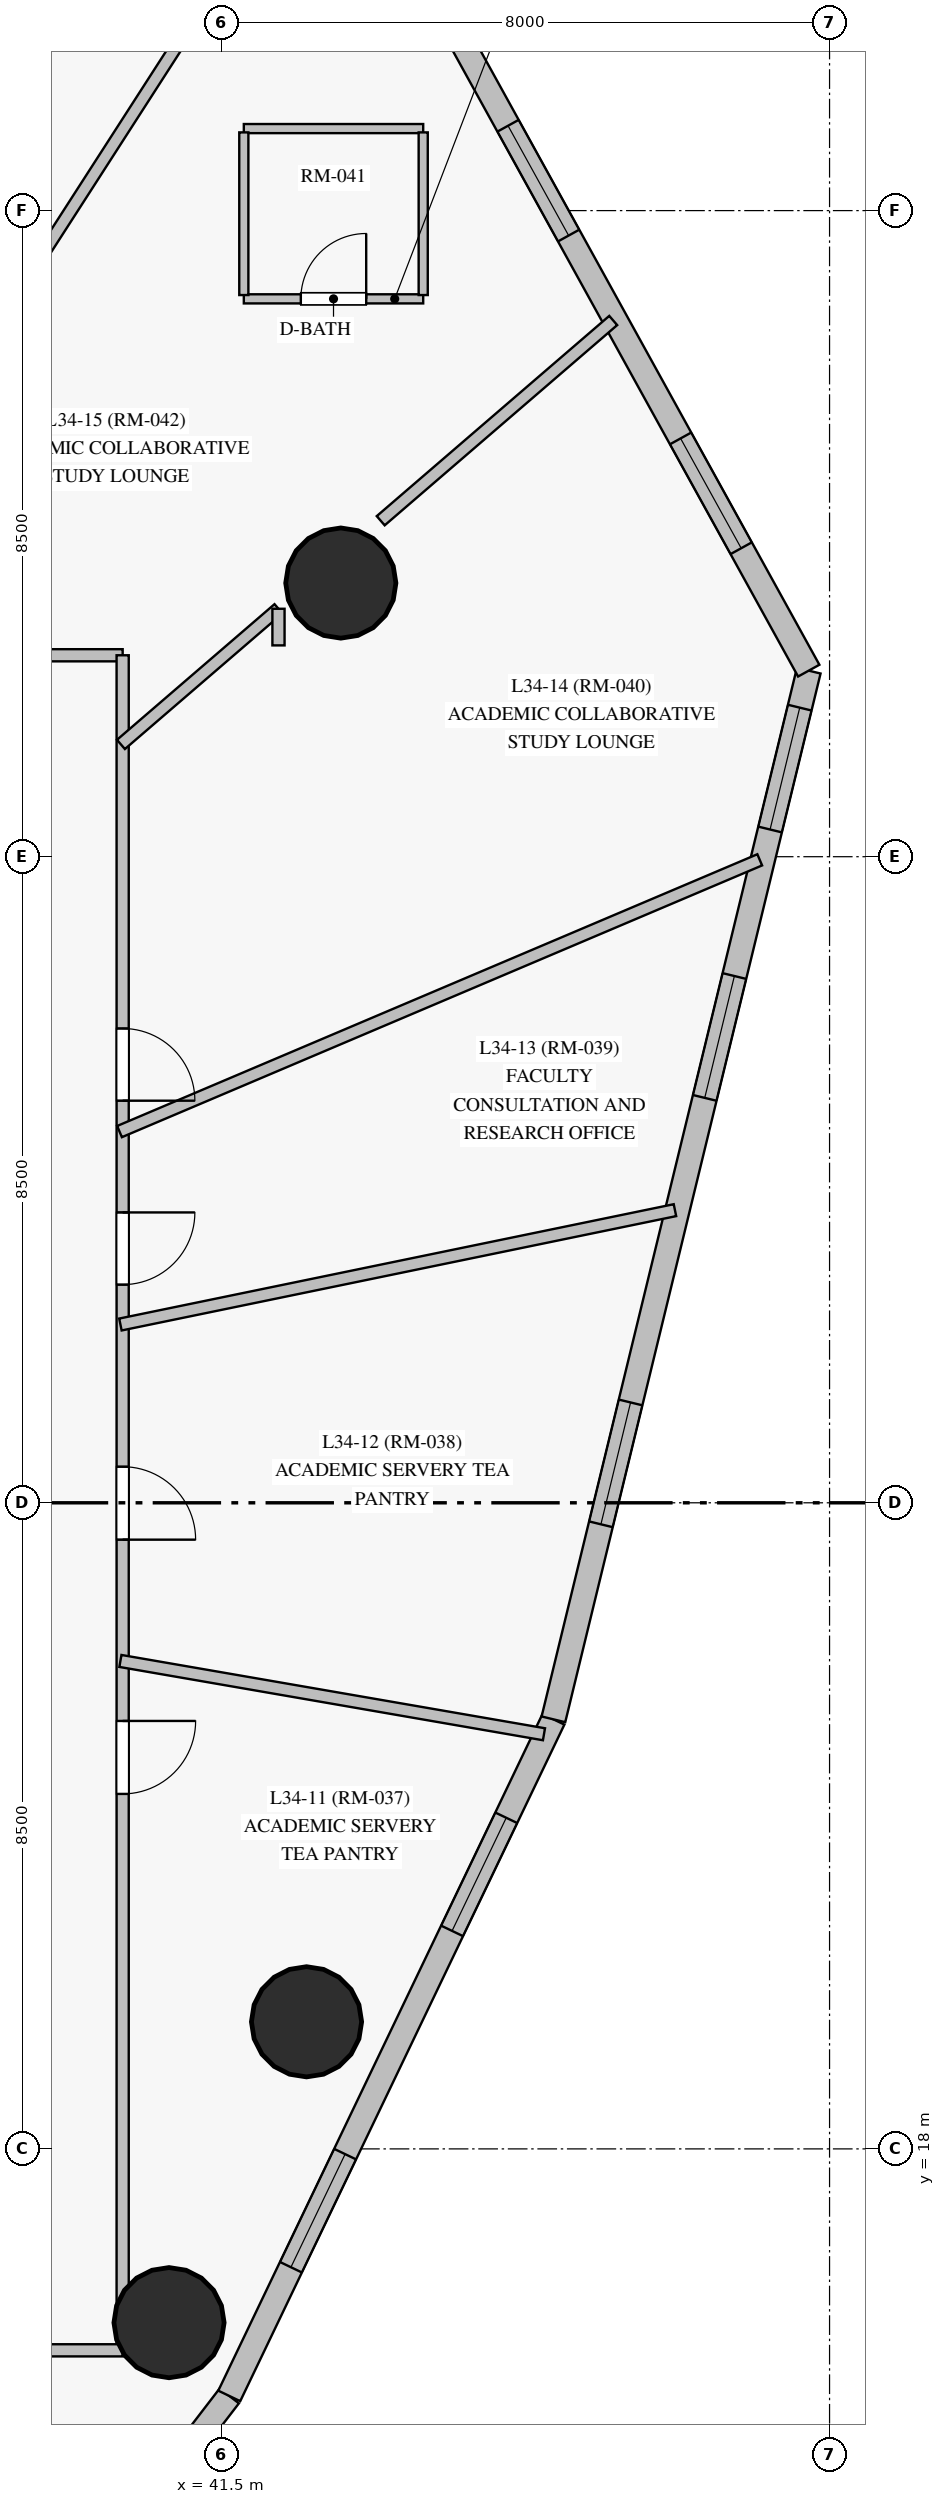
"""IFC4 building model, lengths in metres.
Left out: names, types, materials, properties, quantities, classifications, styles, units other than length and angle.
Written with IfcOpenShell. Run it as: python <this file> out.ifc"""

import sys

from ifc_helpers import new_model, si_unit, direction, frame, frame_2d, origin, origin_with_axes, origin_2d, place, context, subcontext, project, spatial, rectangle, circle, extrude, source, transform, mapped, element, fill, save


model = new_model("IFC4")
c1 = context("Model", 3, precision=1e-05, world=origin(), true_north=direction((0.0, 1.0)))
c2 = subcontext(c1, "Body", "Model", "MODEL_VIEW")
j1 = project(units=[si_unit("LENGTHUNIT", "METRE"), si_unit("PLANEANGLEUNIT", "RADIAN")], contexts=[c1])
p1 = place(None, origin())
s1 = spatial("IfcSite", under=j1, at=p1, CompositionType="ELEMENT")
p2 = place(p1, origin())
s2 = spatial("IfcBuilding", under=s1, at=p2, CompositionType="ELEMENT")
p3 = place(p2, frame((0.0, 0.0, 123.65)))
s3 = spatial("IfcBuildingStorey", under=s2, at=p3, CompositionType="ELEMENT", Elevation=123.65)
m1 = source(origin_with_axes(), c2, "Body", "SweptSolid", [
    extrude(circle(Radius=0.725, at=origin_2d()), origin(), (0.0, 0.0, 1.0), 3.05),
])
for number, where, z_axis, x_axis in (
    (1, (42.619, 19.672, 0.0), (0.0, 0.0, 1.0), (1.0, 0.0, 0.0)),
    (2, (43.07, 38.6, 0.0), (0.0, 0.0, 1.0), (1.0, 0.0, 0.0)),
    (3, (40.81, 15.714, 0.0), (0.0, 0.0, 1.0), (1.0, 0.0, 0.0)),
):
    element("IfcColumn", number, at=place(p3, frame(where, z_axis=z_axis, x_axis=x_axis)), inside=s3, PredefinedType="COLUMN", context=c2, shape_type="MappedRepresentation", body=[
        mapped(m1, transform((0.0, 0.0, 0.0), scale=1.0)),
    ])
p4 = place(p3, frame((32.955, 3.487, 0.0), z_axis=(0.0, 0.0, 1.0), x_axis=(0.608995925668, 0.793173349603, 0.0)))
e4 = element("IfcWall", 4, at=p4, inside=s3, PredefinedType="SOLIDWALL", context=c2, shape_type="SweptSolid", body=[
    extrude(rectangle(XDim=14.199, YDim=0.32, at=frame_2d((7.1, 0.0))), origin(), (0.0, 0.0, 1.0), 2.825),
])
p5 = place(p4, frame((2.36, 0.0, 0.85)))
e5 = element("IfcOpeningElement", 5, at=p5, cuts=e4, PredefinedType="OPENING", context=c2, shape_type="SweptSolid", body=[
    extrude(rectangle(XDim=1.65, YDim=1.65, at=frame_2d((0.825, 0.825))), frame((0.0, 0.17, 0.0), z_axis=(0.0, -1.0, 0.0), x_axis=(1.0, 0.0, 0.0)), (0.0, 0.0, 1.0), 0.34),
])
p6 = place(p4, frame((6.467, 0.0, 0.85)))
e6 = element("IfcOpeningElement", 6, at=p6, cuts=e4, PredefinedType="OPENING", context=c2, shape_type="SweptSolid", body=[
    extrude(rectangle(XDim=1.65, YDim=1.65, at=frame_2d((0.825, 0.825))), frame((0.0, 0.17, 0.0), z_axis=(0.0, -1.0, 0.0), x_axis=(1.0, 0.0, 0.0)), (0.0, 0.0, 1.0), 0.34),
])
p7 = place(p4, frame((10.573, 0.0, 0.85)))
e7 = element("IfcOpeningElement", 7, at=p7, cuts=e4, PredefinedType="OPENING", context=c2, shape_type="SweptSolid", body=[
    extrude(rectangle(XDim=1.65, YDim=1.65, at=frame_2d((0.825, 0.825))), frame((0.0, 0.17, 0.0), z_axis=(0.0, -1.0, 0.0), x_axis=(1.0, 0.0, 0.0)), (0.0, 0.0, 1.0), 0.34),
])
p8 = place(p3, frame((41.603, 14.75, 0.0), z_axis=(0.0, 0.0, 1.0), x_axis=(0.432081203799, 0.901834703991, 0.0)))
e8 = element("IfcWall", 8, at=p8, inside=s3, PredefinedType="SOLIDWALL", context=c2, shape_type="SweptSolid", body=[
    extrude(rectangle(XDim=9.87, YDim=0.32, at=frame_2d((4.935, 0.0))), origin(), (0.0, 0.0, 1.0), 2.825),
])
p9 = place(p8, frame((1.877, 0.0, 0.85)))
e9 = element("IfcOpeningElement", 9, at=p9, cuts=e8, PredefinedType="OPENING", context=c2, shape_type="SweptSolid", body=[
    extrude(rectangle(XDim=1.65, YDim=1.65, at=frame_2d((0.825, 0.825))), frame((0.0, 0.17, 0.0), z_axis=(0.0, -1.0, 0.0), x_axis=(1.0, 0.0, 0.0)), (0.0, 0.0, 1.0), 0.34),
])
p10 = place(p8, frame((6.784, 0.0, 0.85)))
e10 = element("IfcOpeningElement", 10, at=p10, cuts=e8, PredefinedType="OPENING", context=c2, shape_type="SweptSolid", body=[
    extrude(rectangle(XDim=1.65, YDim=1.65, at=frame_2d((0.825, 0.825))), frame((0.0, 0.17, 0.0), z_axis=(0.0, -1.0, 0.0), x_axis=(1.0, 0.0, 0.0)), (0.0, 0.0, 1.0), 0.34),
])
p11 = place(p3, frame((45.867, 23.651, 0.0), z_axis=(0.0, 0.0, 1.0), x_axis=(0.236563917857, 0.97161592863, 0.0)))
e11 = element("IfcWall", 11, at=p11, inside=s3, PredefinedType="SOLIDWALL", context=c2, shape_type="SweptSolid", body=[
    extrude(rectangle(XDim=14.2, YDim=0.32, at=frame_2d((7.1, 0.0))), origin(), (0.0, 0.0, 1.0), 2.825),
])
p12 = place(p11, frame((2.641, 0.0, 0.85)))
e12 = element("IfcOpeningElement", 12, at=p12, cuts=e11, PredefinedType="OPENING", context=c2, shape_type="SweptSolid", body=[
    extrude(rectangle(XDim=1.65, YDim=1.65, at=frame_2d((0.825, 0.825))), frame((0.0, 0.17, 0.0), z_axis=(0.0, -1.0, 0.0), x_axis=(1.0, 0.0, 0.0)), (0.0, 0.0, 1.0), 0.34),
])
p13 = place(p11, frame((8.415, 0.0, 0.85)))
e13 = element("IfcOpeningElement", 13, at=p13, cuts=e11, PredefinedType="OPENING", context=c2, shape_type="SweptSolid", body=[
    extrude(rectangle(XDim=1.65, YDim=1.65, at=frame_2d((0.825, 0.825))), frame((0.0, 0.17, 0.0), z_axis=(0.0, -1.0, 0.0), x_axis=(1.0, 0.0, 0.0)), (0.0, 0.0, 1.0), 0.34),
])
p14 = place(p11, frame((12.049, 0.0, 0.85)))
e14 = element("IfcOpeningElement", 14, at=p14, cuts=e11, PredefinedType="OPENING", context=c2, shape_type="SweptSolid", body=[
    extrude(rectangle(XDim=1.65, YDim=1.65, at=frame_2d((0.825, 0.825))), frame((0.0, 0.17, 0.0), z_axis=(0.0, -1.0, 0.0), x_axis=(1.0, 0.0, 0.0)), (0.0, 0.0, 1.0), 0.34),
])
p15 = place(p3, frame((49.226, 37.448, 0.0), z_axis=(0.0, 0.0, 1.0), x_axis=(-0.483190594732, 0.875515190709, 0.0)))
e15 = element("IfcWall", 15, at=p15, inside=s3, PredefinedType="SOLIDWALL", context=c2, shape_type="SweptSolid", body=[
    extrude(rectangle(XDim=9.517, YDim=0.32, at=frame_2d((4.758, 0.0))), origin(), (0.0, 0.0, 1.0), 2.825),
])
p16 = place(p15, frame((1.839, 0.0, 0.85)))
e16 = element("IfcOpeningElement", 16, at=p16, cuts=e15, PredefinedType="OPENING", context=c2, shape_type="SweptSolid", body=[
    extrude(rectangle(XDim=1.65, YDim=1.65, at=frame_2d((0.825, 0.825))), frame((0.0, 0.17, 0.0), z_axis=(0.0, -1.0, 0.0), x_axis=(1.0, 0.0, 0.0)), (0.0, 0.0, 1.0), 0.34),
])
p17 = place(p15, frame((6.538, 0.0, 0.85)))
e17 = element("IfcOpeningElement", 17, at=p17, cuts=e15, PredefinedType="OPENING", context=c2, shape_type="SweptSolid", body=[
    extrude(rectangle(XDim=1.65, YDim=1.65, at=frame_2d((0.825, 0.825))), frame((0.0, 0.17, 0.0), z_axis=(0.0, -1.0, 0.0), x_axis=(1.0, 0.0, 0.0)), (0.0, 0.0, 1.0), 0.34),
])
p18 = place(p3, frame((16.7, 37.65, 0.0), z_axis=(0.0, 0.0, 1.0), x_axis=(1.0, 0.0, 0.0)))
e18 = element("IfcWall", 18, at=p18, inside=s3, PredefinedType="PARTITIONING", context=c2, shape_type="SweptSolid", body=[
    extrude(rectangle(XDim=23.5, YDim=0.16, at=frame_2d((11.75, 0.0))), origin(), (0.0, 0.0, 1.0), 2.325),
])
p19 = place(p18, frame((20.866, 0.0, 0.0)))
e19 = element("IfcOpeningElement", 19, at=p19, cuts=e18, PredefinedType="OPENING", context=c2, shape_type="SweptSolid", body=[
    extrude(rectangle(XDim=0.95, YDim=2.15, at=frame_2d((0.475, 1.075))), frame((0.0, 0.09, 0.0), z_axis=(0.0, -1.0, 0.0), x_axis=(1.0, 0.0, 0.0)), (0.0, 0.0, 1.0), 0.18),
])
p20 = place(p18, frame((17.15, 0.0, 0.0)))
e20 = element("IfcOpeningElement", 20, at=p20, cuts=e18, PredefinedType="OPENING", context=c2, shape_type="SweptSolid", body=[
    extrude(rectangle(XDim=0.95, YDim=2.15, at=frame_2d((0.475, 1.075))), frame((0.0, 0.09, 0.0), z_axis=(0.0, -1.0, 0.0), x_axis=(1.0, 0.0, 0.0)), (0.0, 0.0, 1.0), 0.18),
])
p21 = place(p18, frame((14.76, 0.0, 0.0)))
e21 = element("IfcOpeningElement", 21, at=p21, cuts=e18, PredefinedType="OPENING", context=c2, shape_type="SweptSolid", body=[
    extrude(rectangle(XDim=0.96, YDim=2.15, at=frame_2d((0.48, 1.075))), frame((0.0, 0.09, 0.0), z_axis=(0.0, -1.0, 0.0), x_axis=(1.0, 0.0, 0.0)), (0.0, 0.0, 1.0), 0.18),
])
p22 = place(p18, frame((11.275, 0.0, 0.0)))
e22 = element("IfcOpeningElement", 22, at=p22, cuts=e18, PredefinedType="OPENING", context=c2, shape_type="SweptSolid", body=[
    extrude(rectangle(XDim=0.95, YDim=2.15, at=frame_2d((0.475, 1.075))), frame((0.0, 0.09, 0.0), z_axis=(0.0, -1.0, 0.0), x_axis=(1.0, 0.0, 0.0)), (0.0, 0.0, 1.0), 0.18),
])
p23 = place(p18, frame((7.75, 0.0, 0.0)))
e23 = element("IfcOpeningElement", 23, at=p23, cuts=e18, PredefinedType="OPENING", context=c2, shape_type="SweptSolid", body=[
    extrude(rectangle(XDim=0.95, YDim=2.15, at=frame_2d((0.475, 1.075))), frame((0.0, 0.09, 0.0), z_axis=(0.0, -1.0, 0.0), x_axis=(1.0, 0.0, 0.0)), (0.0, 0.0, 1.0), 0.18),
])
p24 = place(p18, frame((4.96, 0.0, 0.0)))
e24 = element("IfcOpeningElement", 24, at=p24, cuts=e18, PredefinedType="OPENING", context=c2, shape_type="SweptSolid", body=[
    extrude(rectangle(XDim=0.95, YDim=2.15, at=frame_2d((0.475, 1.075))), frame((0.0, 0.09, 0.0), z_axis=(0.0, -1.0, 0.0), x_axis=(1.0, 0.0, 0.0)), (0.0, 0.0, 1.0), 0.18),
])
p25 = place(p3, frame((40.2, 37.65, 0.0), z_axis=(0.0, 0.0, 1.0), x_axis=(0.0, -1.0, 0.0)))
e25 = element("IfcWall", 25, at=p25, inside=s3, PredefinedType="PARTITIONING", context=c2, shape_type="SweptSolid", body=[
    extrude(rectangle(XDim=22.3, YDim=0.16, at=frame_2d((11.15, 0.0))), origin(), (0.0, 0.0, 1.0), 2.325),
])
p26 = place(p25, frame((14.02, 0.0, 0.0)))
e26 = element("IfcOpeningElement", 26, at=p26, cuts=e25, PredefinedType="OPENING", context=c2, shape_type="SweptSolid", body=[
    extrude(rectangle(XDim=0.96, YDim=2.15, at=frame_2d((0.48, 1.075))), frame((0.0, 0.09, 0.0), z_axis=(0.0, -1.0, 0.0), x_axis=(1.0, 0.0, 0.0)), (0.0, 0.0, 1.0), 0.18),
])
p27 = place(p25, frame((10.675, 0.0, 0.0)))
e27 = element("IfcOpeningElement", 27, at=p27, cuts=e25, PredefinedType="OPENING", context=c2, shape_type="SweptSolid", body=[
    extrude(rectangle(XDim=0.96, YDim=2.15, at=frame_2d((0.48, 1.075))), frame((0.0, 0.09, 0.0), z_axis=(0.0, -1.0, 0.0), x_axis=(1.0, 0.0, 0.0)), (0.0, 0.0, 1.0), 0.18),
])
p28 = place(p25, frame((7.33, 0.0, 0.0)))
e28 = element("IfcOpeningElement", 28, at=p28, cuts=e25, PredefinedType="OPENING", context=c2, shape_type="SweptSolid", body=[
    extrude(rectangle(XDim=0.95, YDim=2.15, at=frame_2d((0.475, 1.075))), frame((0.0, 0.09, 0.0), z_axis=(0.0, -1.0, 0.0), x_axis=(1.0, 0.0, 0.0)), (0.0, 0.0, 1.0), 0.18),
])
p29 = place(p25, frame((4.91, 0.0, 0.0)))
e29 = element("IfcOpeningElement", 29, at=p29, cuts=e25, PredefinedType="OPENING", context=c2, shape_type="SweptSolid", body=[
    extrude(rectangle(XDim=0.95, YDim=2.15, at=frame_2d((0.475, 1.075))), frame((0.0, 0.09, 0.0), z_axis=(0.0, -1.0, 0.0), x_axis=(1.0, 0.0, 0.0)), (0.0, 0.0, 1.0), 0.18),
])
p30 = place(p3, frame((35.734, 37.625, 0.0), z_axis=(0.0, 0.0, 1.0), x_axis=(0.54132507633, 0.840813392933, 0.0)))
e30 = element("IfcWall", 30, at=p30, inside=s3, PredefinedType="PARTITIONING", context=c2, shape_type="SweptSolid", body=[
    extrude(rectangle(XDim=10.913, YDim=0.16, at=frame_2d((5.457, 0.0))), origin(), (0.0, 0.0, 1.0), 2.825),
])
p31 = place(p3, frame((40.2, 15.35, 0.0), z_axis=(0.0, 0.0, 1.0), x_axis=(-1.0, 0.0, 0.0)))
e31 = element("IfcWall", 31, at=p31, inside=s3, PredefinedType="PARTITIONING", context=c2, shape_type="SweptSolid", body=[
    extrude(rectangle(XDim=10.65, YDim=0.16, at=frame_2d((5.325, 0.0))), origin(), (0.0, 0.0, 1.0), 2.225),
])
p32 = place(p31, frame((4.85, 0.0, 0.0)))
e32 = element("IfcOpeningElement", 32, at=p32, cuts=e31, PredefinedType="OPENING", context=c2, shape_type="SweptSolid", body=[
    extrude(rectangle(XDim=0.95, YDim=2.15, at=frame_2d((0.475, 1.075))), frame((0.0, 0.09, 0.0), z_axis=(0.0, -1.0, 0.0), x_axis=(1.0, 0.0, 0.0)), (0.0, 0.0, 1.0), 0.18),
])
p33 = place(p3, frame((40.159, 31.384, 0.0), z_axis=(0.0, 0.0, 1.0), x_axis=(0.920504437764, 0.390732107789, 0.0)))
e33 = element("IfcWall", 33, at=p33, inside=s3, PredefinedType="PARTITIONING", context=c2, shape_type="SweptSolid", body=[
    extrude(rectangle(XDim=9.15, YDim=0.16, at=frame_2d((4.575, 0.0))), origin(), (0.0, 0.0, 1.0), 2.825),
])
p34 = place(p3, frame((40.171, 28.845, 0.0), z_axis=(0.0, 0.0, 1.0), x_axis=(0.979393402189, 0.201961787842, 0.0)))
e34 = element("IfcWall", 34, at=p34, inside=s3, PredefinedType="PARTITIONING", context=c2, shape_type="SweptSolid", body=[
    extrude(rectangle(XDim=7.449, YDim=0.16, at=frame_2d((3.725, 0.0))), origin(), (0.0, 0.0, 1.0), 2.825),
])
p35 = place(p3, frame((40.17, 24.419, 0.0), z_axis=(0.0, 0.0, 1.0), x_axis=(0.985353993347, -0.170521282529, 0.0)))
e35 = element("IfcWall", 35, at=p35, inside=s3, PredefinedType="PARTITIONING", context=c2, shape_type="SweptSolid", body=[
    extrude(rectangle(XDim=5.655, YDim=0.16, at=frame_2d((2.828, 0.0))), origin(), (0.0, 0.0, 1.0), 2.825),
])
p36 = place(p3, frame((43.595, 39.42, 0.0), z_axis=(0.0, 0.0, 1.0), x_axis=(0.757734743663, 0.6525626853, 0.0)))
e36 = element("IfcWall", 36, at=p36, inside=s3, PredefinedType="PARTITIONING", context=c2, shape_type="SweptSolid", body=[
    extrude(rectangle(XDim=4.037, YDim=0.16, at=frame_2d((2.019, 0.0))), origin(), (0.0, 0.0, 1.0), 2.825),
])
p37 = place(p3, frame((40.177, 36.477, 0.0), z_axis=(0.0, 0.0, 1.0), x_axis=(0.757761446907, 0.652531677071, 0.0)))
e37 = element("IfcWall", 37, at=p37, inside=s3, PredefinedType="PARTITIONING", context=c2, shape_type="SweptSolid", body=[
    extrude(rectangle(XDim=2.735, YDim=0.16, at=frame_2d((1.368, 0.0))), origin(), (0.0, 0.0, 1.0), 2.225),
])
p38 = place(p3, frame((41.794, 42.339, 0.0), z_axis=(0.0, 0.0, 1.0), x_axis=(1.0, 0.0, 0.0)))
e38 = element("IfcWall", 38, at=p38, inside=s3, PredefinedType="PARTITIONING", context=c2, shape_type="SweptSolid", body=[
    extrude(rectangle(XDim=2.36, YDim=0.12, at=frame_2d((1.18, 0.0))), origin(), (0.0, 0.0, 1.0), 2.825),
])
p39 = place(p38, frame((0.75, 0.0, 0.0)))
e39 = element("IfcOpeningElement", 39, at=p39, cuts=e38, PredefinedType="OPENING", context=c2, shape_type="SweptSolid", body=[
    extrude(rectangle(XDim=0.86, YDim=2.1, at=frame_2d((0.43, 1.05))), frame((0.0, 0.07, 0.0), z_axis=(0.0, -1.0, 0.0), x_axis=(1.0, 0.0, 0.0)), (0.0, 0.0, 1.0), 0.14),
])
p40 = place(p3, frame((44.154, 44.579, 0.0), z_axis=(0.0, 0.0, 1.0), x_axis=(-1.0, 0.0, 0.0)))
e40 = element("IfcWall", 40, at=p40, inside=s3, PredefinedType="PARTITIONING", context=c2, shape_type="SweptSolid", body=[
    extrude(rectangle(XDim=2.36, YDim=0.12, at=frame_2d((1.18, 0.0))), origin(), (0.0, 0.0, 1.0), 2.825),
])
for number, where, z_axis, x_axis in (
    (41, (44.154, 42.389, 0.0), (0.0, 0.0, 1.0), (0.0, 1.0, 0.0)),
    (42, (41.794, 44.529, 0.0), (0.0, 0.0, 1.0), (0.0, -1.0, 0.0)),
):
    element("IfcWall", number, at=place(p3, frame(where, z_axis=z_axis, x_axis=x_axis)), inside=s3, PredefinedType="PARTITIONING", context=c2, shape_type="SweptSolid", body=[
        extrude(rectangle(XDim=2.14, YDim=0.12, at=frame_2d((1.07, 0.0))), origin(), (0.0, 0.0, 1.0), 2.825),
    ])
p41 = place(p3, frame((42.25, 38.262, 0.0), z_axis=(0.0, 0.0, 1.0), x_axis=(0.0, -1.0, 0.0)))
e43 = element("IfcWall", 43, at=p41, inside=s3, PredefinedType="PARTITIONING", context=c2, shape_type="SweptSolid", body=[
    extrude(rectangle(XDim=0.482, YDim=0.16, at=frame_2d((0.241, 0.0))), origin(), (0.0, 0.0, 1.0), 2.325),
])
m2 = source(origin_with_axes(), c2, "Body", "SweptSolid", [
    extrude(rectangle(XDim=1.65, YDim=1.65, at=frame_2d((0.825, 0.825))), frame((0.0, 0.03, 0.0), z_axis=(0.0, -1.0, 0.0), x_axis=(1.0, 0.0, 0.0)), (0.0, 0.0, 1.0), 0.06),
])
p42 = place(p9, origin())
e44 = element("IfcWindow", 44, at=p42, inside=s3, PartitioningType="SINGLE_PANEL", PredefinedType="WINDOW", context=c2, shape_type="MappedRepresentation", body=[
    mapped(m2, transform((0.0, 0.0, 0.0), scale=1.0)),
])
fill(e9, e44)
p43 = place(p10, origin())
e45 = element("IfcWindow", 45, at=p43, inside=s3, PartitioningType="SINGLE_PANEL", PredefinedType="WINDOW", context=c2, shape_type="MappedRepresentation", body=[
    mapped(m2, transform((0.0, 0.0, 0.0), scale=1.0)),
])
fill(e10, e45)
p44 = place(p12, origin())
e46 = element("IfcWindow", 46, at=p44, inside=s3, PartitioningType="SINGLE_PANEL", PredefinedType="WINDOW", context=c2, shape_type="MappedRepresentation", body=[
    mapped(m2, transform((0.0, 0.0, 0.0), scale=1.0)),
])
fill(e12, e46)
p45 = place(p13, origin())
e47 = element("IfcWindow", 47, at=p45, inside=s3, PartitioningType="SINGLE_PANEL", PredefinedType="WINDOW", context=c2, shape_type="MappedRepresentation", body=[
    mapped(m2, transform((0.0, 0.0, 0.0), scale=1.0)),
])
fill(e13, e47)
p46 = place(p14, origin())
e48 = element("IfcWindow", 48, at=p46, inside=s3, PartitioningType="SINGLE_PANEL", PredefinedType="WINDOW", context=c2, shape_type="MappedRepresentation", body=[
    mapped(m2, transform((0.0, 0.0, 0.0), scale=1.0)),
])
fill(e14, e48)
p47 = place(p16, origin())
e49 = element("IfcWindow", 49, at=p47, inside=s3, PartitioningType="SINGLE_PANEL", PredefinedType="WINDOW", context=c2, shape_type="MappedRepresentation", body=[
    mapped(m2, transform((0.0, 0.0, 0.0), scale=1.0)),
])
fill(e16, e49)
p48 = place(p17, origin())
e50 = element("IfcWindow", 50, at=p48, inside=s3, PartitioningType="SINGLE_PANEL", PredefinedType="WINDOW", context=c2, shape_type="MappedRepresentation", body=[
    mapped(m2, transform((0.0, 0.0, 0.0), scale=1.0)),
])
fill(e17, e50)
m3 = source(origin_with_axes(), c2, "Body", "SweptSolid", [
    extrude(rectangle(XDim=0.86, YDim=2.1, at=frame_2d((0.43, 1.05))), frame((0.0, 0.025, 0.0), z_axis=(0.0, -1.0, 0.0), x_axis=(1.0, 0.0, 0.0)), (0.0, 0.0, 1.0), 0.05),
])
p49 = place(p39, origin())
e51 = element("IfcDoor", 51, at=p49, inside=s3, OperationType="SINGLE_SWING_RIGHT", PredefinedType="DOOR", context=c2, shape_type="MappedRepresentation", body=[
    mapped(m3, transform((0.0, 0.0, 0.0), scale=1.0)),
])
fill(e39, e51)
m4 = source(origin_with_axes(), c2, "Body", "SweptSolid", [
    extrude(rectangle(XDim=0.96, YDim=2.15, at=frame_2d((0.48, 1.075))), frame((0.0, 0.025, 0.0), z_axis=(0.0, -1.0, 0.0), x_axis=(1.0, 0.0, 0.0)), (0.0, 0.0, 1.0), 0.05),
])
p50 = place(p26, origin())
e52 = element("IfcDoor", 52, at=p50, inside=s3, OperationType="SINGLE_SWING_LEFT", PredefinedType="DOOR", context=c2, shape_type="MappedRepresentation", body=[
    mapped(m4, transform((0.0, 0.0, 0.0), scale=1.0)),
])
fill(e26, e52)
p51 = place(p27, origin())
e53 = element("IfcDoor", 53, at=p51, inside=s3, OperationType="SINGLE_SWING_RIGHT", PredefinedType="DOOR", context=c2, shape_type="MappedRepresentation", body=[
    mapped(m4, transform((0.0, 0.0, 0.0), scale=1.0)),
])
fill(e27, e53)
m5 = source(origin_with_axes(), c2, "Body", "SweptSolid", [
    extrude(rectangle(XDim=0.95, YDim=2.15, at=frame_2d((0.475, 1.075))), frame((0.0, 0.025, 0.0), z_axis=(0.0, -1.0, 0.0), x_axis=(1.0, 0.0, 0.0)), (0.0, 0.0, 1.0), 0.05),
])
p52 = place(p28, origin())
e54 = element("IfcDoor", 54, at=p52, inside=s3, OperationType="SINGLE_SWING_LEFT", PredefinedType="DOOR", context=c2, shape_type="MappedRepresentation", body=[
    mapped(m5, transform((0.0, 0.0, 0.0), scale=1.0)),
])
fill(e28, e54)
p53 = place(p29, origin())
e55 = element("IfcDoor", 55, at=p53, inside=s3, OperationType="SINGLE_SWING_RIGHT", PredefinedType="DOOR", context=c2, shape_type="MappedRepresentation", body=[
    mapped(m5, transform((0.0, 0.0, 0.0), scale=1.0)),
])
fill(e29, e55)
save(model, sys.argv[1])
